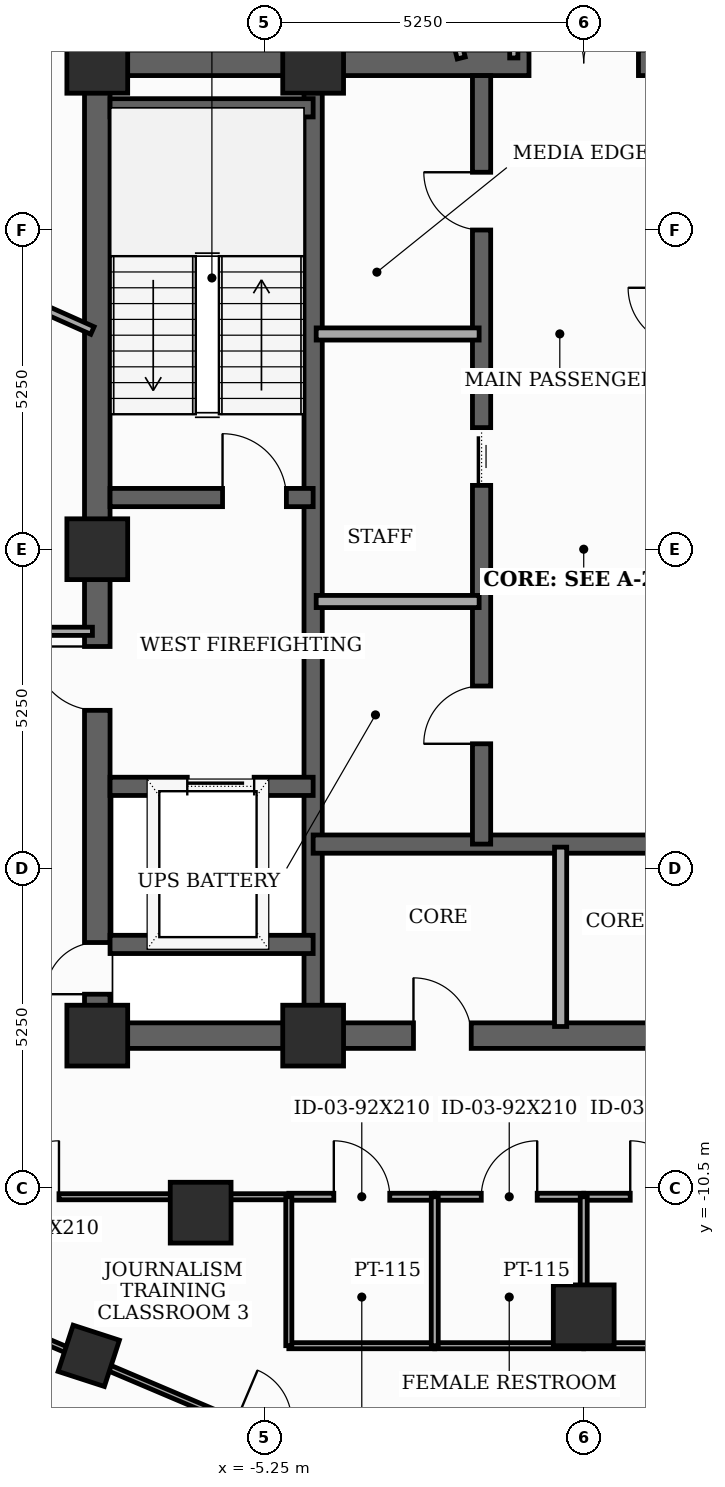
"""IFC4 building model, lengths in metres.
Left out: names, types, materials, properties, quantities, classifications, styles, units other than length and angle.
Written with IfcOpenShell. Run it as: python <this file> out.ifc"""

import sys

from ifc_helpers import new_model, si_unit, direction, frame, frame_2d, origin, origin_2d, place, context, subcontext, project, spatial, rectangle, extrude, element, fill, save


model = new_model("IFC4")
c1 = context("Model", 3, precision=1e-05, world=origin(), true_north=direction((0.0, 1.0)))
c2 = subcontext(c1, "Body", "Model", "MODEL_VIEW")
j1 = project(units=[si_unit("LENGTHUNIT", "METRE"), si_unit("PLANEANGLEUNIT", "RADIAN")], contexts=[c1])
p1 = place(None, origin())
s1 = spatial("IfcSite", under=j1, at=p1, CompositionType="ELEMENT")
p2 = place(p1, origin())
s2 = spatial("IfcBuilding", under=s1, at=p2, CompositionType="ELEMENT")
p3 = place(p2, frame((0.0, 0.0, 290.6)))
s3 = spatial("IfcBuildingStorey", under=s2, at=p3, CompositionType="ELEMENT", Elevation=290.6)
for number, where, z_axis, x_axis in (
    (1, (-8.0, -8.0, 0.0), (0.0, 0.0, 1.0), (1.0, 0.0, 0.0)),
    (2, (-4.45, -8.0, 0.0), (0.0, 0.0, 1.0), (1.0, 0.0, 0.0)),
    (3, (-4.45, 8.0, 0.0), (0.0, 0.0, 1.0), (1.0, 0.0, 0.0)),
    (4, (-8.0, 8.0, 0.0), (0.0, 0.0, 1.0), (1.0, 0.0, 0.0)),
    (5, (-8.0, 0.0, 0.0), (0.0, 0.0, 1.0), (1.0, 0.0, 0.0)),
    (6, (-6.3, -10.912, 0.0), (0.0, 0.0, 1.0), (1.0, 0.0, 0.0)),
    (7, (0.0, -12.6, 0.0), (0.0, 0.0, 1.0), (1.0, 0.0, 0.0)),
):
    element("IfcColumn", number, at=place(p3, frame(where, z_axis=z_axis, x_axis=x_axis)), inside=s3, PredefinedType="COLUMN", context=c2, shape_type="SweptSolid", body=[
        extrude(rectangle(XDim=1.0, YDim=1.0, at=origin_2d()), origin(), (0.0, 0.0, 1.0), 3.7),
    ])
p4 = place(p3, frame((-8.14, -13.266, 0.0), z_axis=(0.0, 0.0, 1.0), x_axis=(0.309016994375, 0.951056516295, 0.0)))
e8 = element("IfcColumn", 8, at=p4, inside=s3, PredefinedType="COLUMN", context=c2, shape_type="SweptSolid", body=[
    extrude(rectangle(XDim=0.8, YDim=0.8, at=origin_2d()), origin(), (0.0, 0.0, 1.0), 3.7),
])
p5 = place(p3, frame((-8.0, -8.0, 0.0), z_axis=(0.0, 0.0, 1.0), x_axis=(0.0, 1.0, 0.0)))
e9 = element("IfcWall", 9, at=p5, inside=s3, PredefinedType="SHEAR", context=c2, shape_type="SweptSolid", body=[
    extrude(rectangle(XDim=16.0, YDim=0.42, at=frame_2d((8.0, 0.0))), origin(), (0.0, 0.0, 1.0), 3.5),
])
p6 = place(p5, frame((0.681, 0.0, 0.0)))
e10 = element("IfcOpeningElement", 10, at=p6, cuts=e9, PredefinedType="OPENING", context=c2, shape_type="SweptSolid", body=[
    extrude(rectangle(XDim=0.85, YDim=2.02, at=frame_2d((0.425, 1.01))), frame((0.0, 0.22, 0.0), z_axis=(0.0, -1.0, 0.0), x_axis=(1.0, 0.0, 0.0)), (0.0, 0.0, 1.0), 0.44),
])
p7 = place(p5, frame((5.35, 0.0, 0.0)))
e11 = element("IfcOpeningElement", 11, at=p7, cuts=e9, PredefinedType="OPENING", context=c2, shape_type="SweptSolid", body=[
    extrude(rectangle(XDim=1.05, YDim=2.15, at=frame_2d((0.525, 1.075))), frame((0.0, 0.22, 0.0), z_axis=(0.0, -1.0, 0.0), x_axis=(1.0, 0.0, 0.0)), (0.0, 0.0, 1.0), 0.44),
])
p8 = place(p3, frame((-8.0, -8.0, 0.0), z_axis=(0.0, 0.0, 1.0), x_axis=(1.0, 0.0, 0.0)))
e12 = element("IfcWall", 12, at=p8, inside=s3, PredefinedType="SHEAR", context=c2, shape_type="SweptSolid", body=[
    extrude(rectangle(XDim=16.0, YDim=0.42, at=frame_2d((8.0, 0.0))), origin(), (0.0, 0.0, 1.0), 3.5),
])
p9 = place(p8, frame((5.2, 0.0, 0.0)))
e13 = element("IfcOpeningElement", 13, at=p9, cuts=e12, PredefinedType="OPENING", context=c2, shape_type="SweptSolid", body=[
    extrude(rectangle(XDim=0.95, YDim=2.1, at=frame_2d((0.475, 1.05))), frame((0.0, 0.22, 0.0), z_axis=(0.0, -1.0, 0.0), x_axis=(1.0, 0.0, 0.0)), (0.0, 0.0, 1.0), 0.44),
])
p10 = place(p8, frame((9.8, 0.0, 0.0)))
e14 = element("IfcOpeningElement", 14, at=p10, cuts=e12, PredefinedType="OPENING", context=c2, shape_type="SweptSolid", body=[
    extrude(rectangle(XDim=0.95, YDim=2.1, at=frame_2d((0.475, 1.05))), frame((0.0, 0.22, 0.0), z_axis=(0.0, -1.0, 0.0), x_axis=(1.0, 0.0, 0.0)), (0.0, 0.0, 1.0), 0.44),
])
p11 = place(p3, frame((-8.0, 8.0, 0.0), z_axis=(0.0, 0.0, 1.0), x_axis=(1.0, 0.0, 0.0)))
e15 = element("IfcWall", 15, at=p11, inside=s3, PredefinedType="SHEAR", context=c2, shape_type="SweptSolid", body=[
    extrude(rectangle(XDim=16.0, YDim=0.42, at=frame_2d((8.0, 0.0))), origin(), (0.0, 0.0, 1.0), 3.5),
])
p12 = place(p11, frame((7.1, 0.0, 0.0)))
e16 = element("IfcOpeningElement", 16, at=p12, cuts=e15, PredefinedType="OPENING", context=c2, shape_type="SweptSolid", body=[
    extrude(rectangle(XDim=1.8, YDim=2.15, at=frame_2d((0.9, 1.075))), frame((0.0, 0.22, 0.0), z_axis=(0.0, -1.0, 0.0), x_axis=(1.0, 0.0, 0.0)), (0.0, 0.0, 1.0), 0.44),
])
p13 = place(p3, frame((-4.45, -7.79, 0.0), z_axis=(0.0, 0.0, 1.0), x_axis=(0.0, 1.0, 0.0)))
e17 = element("IfcWall", 17, at=p13, inside=s3, PredefinedType="SHEAR", context=c2, shape_type="SweptSolid", body=[
    extrude(rectangle(XDim=15.58, YDim=0.3, at=frame_2d((7.79, 0.0))), origin(), (0.0, 0.0, 1.0), 3.5),
])
p14 = place(p3, frame((-7.79, 0.85, 0.0), z_axis=(0.0, 0.0, 1.0), x_axis=(1.0, 0.0, 0.0)))
e18 = element("IfcWall", 18, at=p14, inside=s3, PredefinedType="SHEAR", context=c2, shape_type="SweptSolid", body=[
    extrude(rectangle(XDim=3.34, YDim=0.3, at=frame_2d((1.67, 0.0))), origin(), (0.0, 0.0, 1.0), 3.5),
])
p15 = place(p14, frame((1.85, 0.0, 0.0)))
e19 = element("IfcOpeningElement", 19, at=p15, cuts=e18, PredefinedType="OPENING", context=c2, shape_type="SweptSolid", body=[
    extrude(rectangle(XDim=1.05, YDim=2.15, at=frame_2d((0.525, 1.075))), frame((0.0, 0.16, 0.0), z_axis=(0.0, -1.0, 0.0), x_axis=(1.0, 0.0, 0.0)), (0.0, 0.0, 1.0), 0.32),
])
p16 = place(p3, frame((-7.79, 7.26, 0.0), z_axis=(0.0, 0.0, 1.0), x_axis=(1.0, 0.0, 0.0)))
e20 = element("IfcWall", 20, at=p16, inside=s3, PredefinedType="SHEAR", context=c2, shape_type="SweptSolid", body=[
    extrude(rectangle(XDim=3.34, YDim=0.3, at=frame_2d((1.67, 0.0))), origin(), (0.0, 0.0, 1.0), 3.5),
])
p17 = place(p3, frame((-7.79, -3.9, 0.0), z_axis=(0.0, 0.0, 1.0), x_axis=(1.0, 0.0, 0.0)))
e21 = element("IfcWall", 21, at=p17, inside=s3, PredefinedType="SHEAR", context=c2, shape_type="SweptSolid", body=[
    extrude(rectangle(XDim=3.34, YDim=0.3, at=frame_2d((1.67, 0.0))), origin(), (0.0, 0.0, 1.0), 3.5),
])
p18 = place(p17, frame((1.27, 0.0, 0.0)))
e22 = element("IfcOpeningElement", 22, at=p18, cuts=e21, PredefinedType="OPENING", context=c2, shape_type="SweptSolid", body=[
    extrude(rectangle(XDim=1.1, YDim=2.1, at=frame_2d((0.55, 1.05))), frame((0.0, 0.16, 0.0), z_axis=(0.0, -1.0, 0.0), x_axis=(1.0, 0.0, 0.0)), (0.0, 0.0, 1.0), 0.32),
])
p19 = place(p3, frame((-7.79, -6.5, 0.0), z_axis=(0.0, 0.0, 1.0), x_axis=(1.0, 0.0, 0.0)))
e23 = element("IfcWall", 23, at=p19, inside=s3, PredefinedType="SHEAR", context=c2, shape_type="SweptSolid", body=[
    extrude(rectangle(XDim=3.34, YDim=0.3, at=frame_2d((1.67, 0.0))), origin(), (0.0, 0.0, 1.0), 3.5),
])
p20 = place(p3, frame((-4.45, -4.85, 0.0), z_axis=(0.0, 0.0, 1.0), x_axis=(1.0, 0.0, 0.0)))
e24 = element("IfcWall", 24, at=p20, inside=s3, PredefinedType="SHEAR", context=c2, shape_type="SweptSolid", body=[
    extrude(rectangle(XDim=8.9, YDim=0.3, at=frame_2d((4.45, 0.0))), origin(), (0.0, 0.0, 1.0), 3.5),
])
p21 = place(p3, frame((-1.68, -4.85, 0.0), z_axis=(0.0, 0.0, 1.0), x_axis=(0.0, 1.0, 0.0)))
e25 = element("IfcWall", 25, at=p21, inside=s3, PredefinedType="SHEAR", context=c2, shape_type="SweptSolid", body=[
    extrude(rectangle(XDim=12.64, YDim=0.3, at=frame_2d((6.32, 0.0))), origin(), (0.0, 0.0, 1.0), 3.5),
])
p22 = place(p21, frame((1.65, 0.0, 0.0)))
e26 = element("IfcOpeningElement", 26, at=p22, cuts=e25, PredefinedType="OPENING", context=c2, shape_type="SweptSolid", body=[
    extrude(rectangle(XDim=0.95, YDim=2.1, at=frame_2d((0.475, 1.05))), frame((0.0, 0.16, 0.0), z_axis=(0.0, -1.0, 0.0), x_axis=(1.0, 0.0, 0.0)), (0.0, 0.0, 1.0), 0.32),
])
p23 = place(p21, frame((5.9, 0.0, 0.0)))
e27 = element("IfcOpeningElement", 27, at=p23, cuts=e25, PredefinedType="OPENING", context=c2, shape_type="SweptSolid", body=[
    extrude(rectangle(XDim=0.95, YDim=2.1, at=frame_2d((0.475, 1.05))), frame((0.0, 0.16, 0.0), z_axis=(0.0, -1.0, 0.0), x_axis=(1.0, 0.0, 0.0)), (0.0, 0.0, 1.0), 0.32),
])
p24 = place(p21, frame((10.1, 0.0, 0.0)))
e28 = element("IfcOpeningElement", 28, at=p24, cuts=e25, PredefinedType="OPENING", context=c2, shape_type="SweptSolid", body=[
    extrude(rectangle(XDim=0.95, YDim=2.1, at=frame_2d((0.475, 1.05))), frame((0.0, 0.16, 0.0), z_axis=(0.0, -1.0, 0.0), x_axis=(1.0, 0.0, 0.0)), (0.0, 0.0, 1.0), 0.32),
])
p25 = place(p3, frame((-0.38, -7.85, 0.0), z_axis=(0.0, 0.0, 1.0), x_axis=(0.0, 1.0, 0.0)))
e29 = element("IfcWall", 29, at=p25, inside=s3, PredefinedType="SOLIDWALL", context=c2, shape_type="SweptSolid", body=[
    extrude(rectangle(XDim=2.95, YDim=0.2, at=frame_2d((1.475, 0.0))), origin(), (0.0, 0.0, 1.0), 2.885),
])
for number, where, z_axis, x_axis in (
    (30, (-4.4, -0.86, 0.0), (0.0, 0.0, 1.0), (1.0, 0.0, 0.0)),
    (31, (-4.4, 3.54, 0.0), (0.0, 0.0, 1.0), (1.0, 0.0, 0.0)),
):
    element("IfcWall", number, at=place(p3, frame(where, z_axis=z_axis, x_axis=x_axis)), inside=s3, PredefinedType="SOLIDWALL", context=c2, shape_type="SweptSolid", body=[
        extrude(rectangle(XDim=2.68, YDim=0.2, at=frame_2d((1.34, 0.0))), origin(), (0.0, 0.0, 1.0), 3.5),
    ])
p26 = place(p3, frame((-8.08, -1.35, 0.0), z_axis=(0.0, 0.0, 1.0), x_axis=(-1.0, 0.0, 0.0)))
e32 = element("IfcWall", 32, at=p26, inside=s3, PredefinedType="PARTITIONING", context=c2, shape_type="SweptSolid", body=[
    extrude(rectangle(XDim=2.57, YDim=0.135, at=frame_2d((1.285, 0.0))), origin(), (0.0, 0.0, 1.0), 2.885),
])
p27 = place(p3, frame((-10.15, -10.65, 0.0), z_axis=(0.0, 0.0, 1.0), x_axis=(1.0, 0.0, 0.0)))
e33 = element("IfcWall", 33, at=p27, inside=s3, PredefinedType="MOVABLE", context=c2, shape_type="SweptSolid", body=[
    extrude(rectangle(XDim=5.3, YDim=0.1, at=frame_2d((2.65, 0.0))), origin(), (0.0, 0.0, 1.0), 2.885),
])
p28 = place(p27, frame((0.6, 0.0, 0.0)))
e34 = element("IfcOpeningElement", 34, at=p28, cuts=e33, PredefinedType="OPENING", context=c2, shape_type="SweptSolid", body=[
    extrude(rectangle(XDim=0.92, YDim=2.1, at=frame_2d((0.46, 1.05))), frame((0.0, 0.06, 0.0), z_axis=(0.0, -1.0, 0.0), x_axis=(1.0, 0.0, 0.0)), (0.0, 0.0, 1.0), 0.12),
])
p29 = place(p3, frame((-4.85, -10.65, 0.0), z_axis=(0.0, 0.0, 1.0), x_axis=(1.0, 0.0, 0.0)))
e35 = element("IfcWall", 35, at=p29, inside=s3, PredefinedType="PARTITIONING", context=c2, shape_type="SweptSolid", body=[
    extrude(rectangle(XDim=2.4, YDim=0.115, at=frame_2d((1.2, 0.0))), origin(), (0.0, 0.0, 1.0), 3.5),
])
p30 = place(p29, frame((0.74, 0.0, 0.0)))
e36 = element("IfcOpeningElement", 36, at=p30, cuts=e35, PredefinedType="OPENING", context=c2, shape_type="SweptSolid", body=[
    extrude(rectangle(XDim=0.92, YDim=2.1, at=frame_2d((0.46, 1.05))), frame((0.0, 0.067, 0.0), z_axis=(0.0, -1.0, 0.0), x_axis=(1.0, 0.0, 0.0)), (0.0, 0.0, 1.0), 0.135),
])
p31 = place(p3, frame((-2.45, -10.65, 0.0), z_axis=(0.0, 0.0, 1.0), x_axis=(1.0, 0.0, 0.0)))
e37 = element("IfcWall", 37, at=p31, inside=s3, PredefinedType="PARTITIONING", context=c2, shape_type="SweptSolid", body=[
    extrude(rectangle(XDim=2.45, YDim=0.115, at=frame_2d((1.225, 0.0))), origin(), (0.0, 0.0, 1.0), 2.885),
])
p32 = place(p31, frame((0.765, 0.0, 0.0)))
e38 = element("IfcOpeningElement", 38, at=p32, cuts=e37, PredefinedType="OPENING", context=c2, shape_type="SweptSolid", body=[
    extrude(rectangle(XDim=0.92, YDim=2.1, at=frame_2d((0.46, 1.05))), frame((0.0, 0.067, 0.0), z_axis=(0.0, -1.0, 0.0), x_axis=(1.0, 0.0, 0.0)), (0.0, 0.0, 1.0), 0.135),
])
p33 = place(p3, frame((0.0, -10.65, 0.0), z_axis=(0.0, 0.0, 1.0), x_axis=(1.0, 0.0, 0.0)))
e39 = element("IfcWall", 39, at=p33, inside=s3, PredefinedType="PARTITIONING", context=c2, shape_type="SweptSolid", body=[
    extrude(rectangle(XDim=2.45, YDim=0.115, at=frame_2d((1.225, 0.0))), origin(), (0.0, 0.0, 1.0), 3.5),
])
p34 = place(p33, frame((0.765, 0.0, 0.0)))
e40 = element("IfcOpeningElement", 40, at=p34, cuts=e39, PredefinedType="OPENING", context=c2, shape_type="SweptSolid", body=[
    extrude(rectangle(XDim=0.92, YDim=2.1, at=frame_2d((0.46, 1.05))), frame((0.0, 0.067, 0.0), z_axis=(0.0, -1.0, 0.0), x_axis=(1.0, 0.0, 0.0)), (0.0, 0.0, 1.0), 0.135),
])
p35 = place(p3, frame((-1.15, 10.65, 0.0), z_axis=(0.0, 0.0, 1.0), x_axis=(0.0, -1.0, 0.0)))
e41 = element("IfcWall", 41, at=p35, inside=s3, PredefinedType="PARTITIONING", context=c2, shape_type="SweptSolid", body=[
    extrude(rectangle(XDim=2.57, YDim=0.135, at=frame_2d((1.285, 0.0))), origin(), (0.0, 0.0, 1.0), 2.885),
])
p36 = place(p3, frame((-8.08, 3.597, 0.0), z_axis=(0.0, 0.0, 1.0), x_axis=(-0.913542590258, 0.406743083266, 0.0)))
e42 = element("IfcWall", 42, at=p36, inside=s3, PredefinedType="PARTITIONING", context=c2, shape_type="SweptSolid", body=[
    extrude(rectangle(XDim=18.505, YDim=0.135, at=frame_2d((9.252, 0.0))), origin(), (0.0, 0.0, 1.0), 2.885),
])
p37 = place(p36, frame((8.792, 0.0, 0.0)))
e43 = element("IfcOpeningElement", 43, at=p37, cuts=e42, PredefinedType="OPENING", context=c2, shape_type="SweptSolid", body=[
    extrude(rectangle(XDim=0.92, YDim=2.1, at=frame_2d((0.46, 1.05))), frame((0.0, 0.077, 0.0), z_axis=(0.0, -1.0, 0.0), x_axis=(1.0, 0.0, 0.0)), (0.0, 0.0, 1.0), 0.155),
])
p38 = place(p3, frame((-2.45, -13.1, 0.0), z_axis=(0.0, 0.0, 1.0), x_axis=(-1.0, 0.0, 0.0)))
e44 = element("IfcWall", 44, at=p38, inside=s3, PredefinedType="MOVABLE", context=c2, shape_type="SweptSolid", body=[
    extrude(rectangle(XDim=2.4, YDim=0.1, at=frame_2d((1.2, 0.0))), origin(), (0.0, 0.0, 1.0), 3.5),
])
p39 = place(p3, frame((-4.85, -13.1, 0.0), z_axis=(0.0, 0.0, 1.0), x_axis=(0.0, 1.0, 0.0)))
e45 = element("IfcWall", 45, at=p39, inside=s3, PredefinedType="MOVABLE", context=c2, shape_type="SweptSolid", body=[
    extrude(rectangle(XDim=2.45, YDim=0.1, at=frame_2d((1.225, 0.0))), origin(), (0.0, 0.0, 1.0), 2.885),
])
p40 = place(p3, frame((0.0, -13.1, 0.0), z_axis=(0.0, 0.0, 1.0), x_axis=(-1.0, 0.0, 0.0)))
e46 = element("IfcWall", 46, at=p40, inside=s3, PredefinedType="MOVABLE", context=c2, shape_type="SweptSolid", body=[
    extrude(rectangle(XDim=2.45, YDim=0.1, at=frame_2d((1.225, 0.0))), origin(), (0.0, 0.0, 1.0), 3.035),
])
p41 = place(p3, frame((-9.1, -12.916, 0.0), z_axis=(0.0, 0.0, 1.0), x_axis=(0.920506675175, -0.390726836752, 0.0)))
e47 = element("IfcWall", 47, at=p41, inside=s3, PredefinedType="MOVABLE", context=c2, shape_type="SweptSolid", body=[
    extrude(rectangle(XDim=6.659, YDim=0.1, at=frame_2d((3.33, 0.0))), origin(), (0.0, 0.0, 1.0), 3.035),
])
p42 = place(p41, frame((3.669, 0.0, 0.0)))
e48 = element("IfcOpeningElement", 48, at=p42, cuts=e47, PredefinedType="OPENING", context=c2, shape_type="SweptSolid", body=[
    extrude(rectangle(XDim=0.92, YDim=2.1, at=frame_2d((0.46, 1.05))), frame((0.0, 0.06, 0.0), z_axis=(0.0, -1.0, 0.0), x_axis=(1.0, 0.0, 0.0)), (0.0, 0.0, 1.0), 0.12),
])
p43 = place(p3, frame((2.45, -13.1, 0.0), z_axis=(0.0, 0.0, 1.0), x_axis=(-1.0, 0.0, 0.0)))
e49 = element("IfcWall", 49, at=p43, inside=s3, PredefinedType="MOVABLE", context=c2, shape_type="SweptSolid", body=[
    extrude(rectangle(XDim=2.45, YDim=0.1, at=frame_2d((1.225, 0.0))), origin(), (0.0, 0.0, 1.0), 3.035),
])
for number, where, z_axis, x_axis in (
    (50, (-2.45, -13.1, 0.0), (0.0, 0.0, 1.0), (0.0, 1.0, 0.0)),
    (51, (0.0, -13.1, 0.0), (0.0, 0.0, 1.0), (0.0, 1.0, 0.0)),
):
    element("IfcWall", number, at=place(p3, frame(where, z_axis=z_axis, x_axis=x_axis)), inside=s3, PredefinedType="PARTITIONING", context=c2, shape_type="SweptSolid", body=[
        extrude(rectangle(XDim=2.45, YDim=0.115, at=frame_2d((1.225, 0.0))), origin(), (0.0, 0.0, 1.0), 2.885),
    ])
p44 = place(p3, frame((-3.267, 13.104, 0.0), z_axis=(0.0, 0.0, 1.0), x_axis=(0.241825418424, -0.970319775643, 0.0)))
e52 = element("IfcWall", 52, at=p44, inside=s3, PredefinedType="PARTITIONING", context=c2, shape_type="SweptSolid", body=[
    extrude(rectangle(XDim=5.177, YDim=0.135, at=frame_2d((2.588, 0.0))), origin(), (0.0, 0.0, 1.0), 2.885),
])
p45 = place(p6, origin())
e53 = element("IfcDoor", 53, at=p45, inside=s3, OperationType="SINGLE_SWING_LEFT", PredefinedType="TRAPDOOR", context=c2, shape_type="SweptSolid", body=[
    extrude(rectangle(XDim=0.85, YDim=2.02, at=frame_2d((0.425, 1.01))), frame((0.0, 0.025, 0.0), z_axis=(0.0, -1.0, 0.0), x_axis=(1.0, 0.0, 0.0)), (0.0, 0.0, 1.0), 0.05),
])
fill(e10, e53)
p46 = place(p7, origin())
e54 = element("IfcDoor", 54, at=p46, inside=s3, OperationType="SINGLE_SWING_RIGHT", PredefinedType="DOOR", context=c2, shape_type="SweptSolid", body=[
    extrude(rectangle(XDim=1.05, YDim=2.15, at=frame_2d((0.525, 1.075))), frame((0.0, 0.025, 0.0), z_axis=(0.0, -1.0, 0.0), x_axis=(1.0, 0.0, 0.0)), (0.0, 0.0, 1.0), 0.05),
])
fill(e11, e54)
p47 = place(p9, origin())
e55 = element("IfcDoor", 55, at=p47, inside=s3, OperationType="SINGLE_SWING_LEFT", PredefinedType="DOOR", context=c2, shape_type="SweptSolid", body=[
    extrude(rectangle(XDim=0.95, YDim=2.1, at=frame_2d((0.475, 1.05))), frame((0.0, 0.025, 0.0), z_axis=(0.0, -1.0, 0.0), x_axis=(1.0, 0.0, 0.0)), (0.0, 0.0, 1.0), 0.05),
])
fill(e13, e55)
p48 = place(p12, origin())
e56 = element("IfcDoor", 56, at=p48, inside=s3, OperationType="DOUBLE_DOOR_SINGLE_SWING", PredefinedType="DOOR", context=c2, shape_type="SweptSolid", body=[
    extrude(rectangle(XDim=1.8, YDim=2.15, at=frame_2d((0.9, 1.075))), frame((0.0, 0.025, 0.0), z_axis=(0.0, -1.0, 0.0), x_axis=(1.0, 0.0, 0.0)), (0.0, 0.0, 1.0), 0.05),
])
fill(e16, e56)
p49 = place(p15, origin())
e57 = element("IfcDoor", 57, at=p49, inside=s3, OperationType="SINGLE_SWING_LEFT", PredefinedType="DOOR", context=c2, shape_type="SweptSolid", body=[
    extrude(rectangle(XDim=1.05, YDim=2.15, at=frame_2d((0.525, 1.075))), frame((0.0, 0.025, 0.0), z_axis=(0.0, -1.0, 0.0), x_axis=(1.0, 0.0, 0.0)), (0.0, 0.0, 1.0), 0.05),
])
fill(e19, e57)
p50 = place(p18, origin())
e58 = element("IfcDoor", 58, at=p50, inside=s3, OperationType="SLIDING_TO_LEFT", PredefinedType="DOOR", context=c2, shape_type="SweptSolid", body=[
    extrude(rectangle(XDim=1.1, YDim=2.1, at=frame_2d((0.55, 1.05))), frame((0.0, 0.025, 0.0), z_axis=(0.0, -1.0, 0.0), x_axis=(1.0, 0.0, 0.0)), (0.0, 0.0, 1.0), 0.05),
])
fill(e22, e58)
p51 = place(p22, origin())
e59 = element("IfcDoor", 59, at=p51, inside=s3, OperationType="SINGLE_SWING_LEFT", PredefinedType="DOOR", context=c2, shape_type="SweptSolid", body=[
    extrude(rectangle(XDim=0.95, YDim=2.1, at=frame_2d((0.475, 1.05))), frame((0.0, 0.025, 0.0), z_axis=(0.0, -1.0, 0.0), x_axis=(1.0, 0.0, 0.0)), (0.0, 0.0, 1.0), 0.05),
])
fill(e26, e59)
p52 = place(p23, origin())
e60 = element("IfcDoor", 60, at=p52, inside=s3, OperationType="SLIDING_TO_LEFT", PredefinedType="DOOR", context=c2, shape_type="SweptSolid", body=[
    extrude(rectangle(XDim=0.95, YDim=2.1, at=frame_2d((0.475, 1.05))), frame((0.0, 0.025, 0.0), z_axis=(0.0, -1.0, 0.0), x_axis=(1.0, 0.0, 0.0)), (0.0, 0.0, 1.0), 0.05),
])
fill(e27, e60)
p53 = place(p24, origin())
e61 = element("IfcDoor", 61, at=p53, inside=s3, OperationType="SINGLE_SWING_RIGHT", PredefinedType="DOOR", context=c2, shape_type="SweptSolid", body=[
    extrude(rectangle(XDim=0.95, YDim=2.1, at=frame_2d((0.475, 1.05))), frame((0.0, 0.025, 0.0), z_axis=(0.0, -1.0, 0.0), x_axis=(1.0, 0.0, 0.0)), (0.0, 0.0, 1.0), 0.05),
])
fill(e28, e61)
p54 = place(p28, origin())
e62 = element("IfcDoor", 62, at=p54, inside=s3, OperationType="SINGLE_SWING_RIGHT", PredefinedType="DOOR", context=c2, shape_type="SweptSolid", body=[
    extrude(rectangle(XDim=0.92, YDim=2.1, at=frame_2d((0.46, 1.05))), frame((0.0, 0.025, 0.0), z_axis=(0.0, -1.0, 0.0), x_axis=(1.0, 0.0, 0.0)), (0.0, 0.0, 1.0), 0.05),
])
fill(e34, e62)
p55 = place(p30, origin())
e63 = element("IfcDoor", 63, at=p55, inside=s3, OperationType="SINGLE_SWING_LEFT", PredefinedType="DOOR", context=c2, shape_type="SweptSolid", body=[
    extrude(rectangle(XDim=0.92, YDim=2.1, at=frame_2d((0.46, 1.05))), frame((0.0, 0.025, 0.0), z_axis=(0.0, -1.0, 0.0), x_axis=(1.0, 0.0, 0.0)), (0.0, 0.0, 1.0), 0.05),
])
fill(e36, e63)
p56 = place(p32, origin())
e64 = element("IfcDoor", 64, at=p56, inside=s3, OperationType="SINGLE_SWING_RIGHT", PredefinedType="DOOR", context=c2, shape_type="SweptSolid", body=[
    extrude(rectangle(XDim=0.92, YDim=2.1, at=frame_2d((0.46, 1.05))), frame((0.0, 0.025, 0.0), z_axis=(0.0, -1.0, 0.0), x_axis=(1.0, 0.0, 0.0)), (0.0, 0.0, 1.0), 0.05),
])
fill(e38, e64)
p57 = place(p34, origin())
e65 = element("IfcDoor", 65, at=p57, inside=s3, OperationType="SINGLE_SWING_LEFT", PredefinedType="DOOR", context=c2, shape_type="SweptSolid", body=[
    extrude(rectangle(XDim=0.92, YDim=2.1, at=frame_2d((0.46, 1.05))), frame((0.0, 0.025, 0.0), z_axis=(0.0, -1.0, 0.0), x_axis=(1.0, 0.0, 0.0)), (0.0, 0.0, 1.0), 0.05),
])
fill(e40, e65)
save(model, sys.argv[1])
